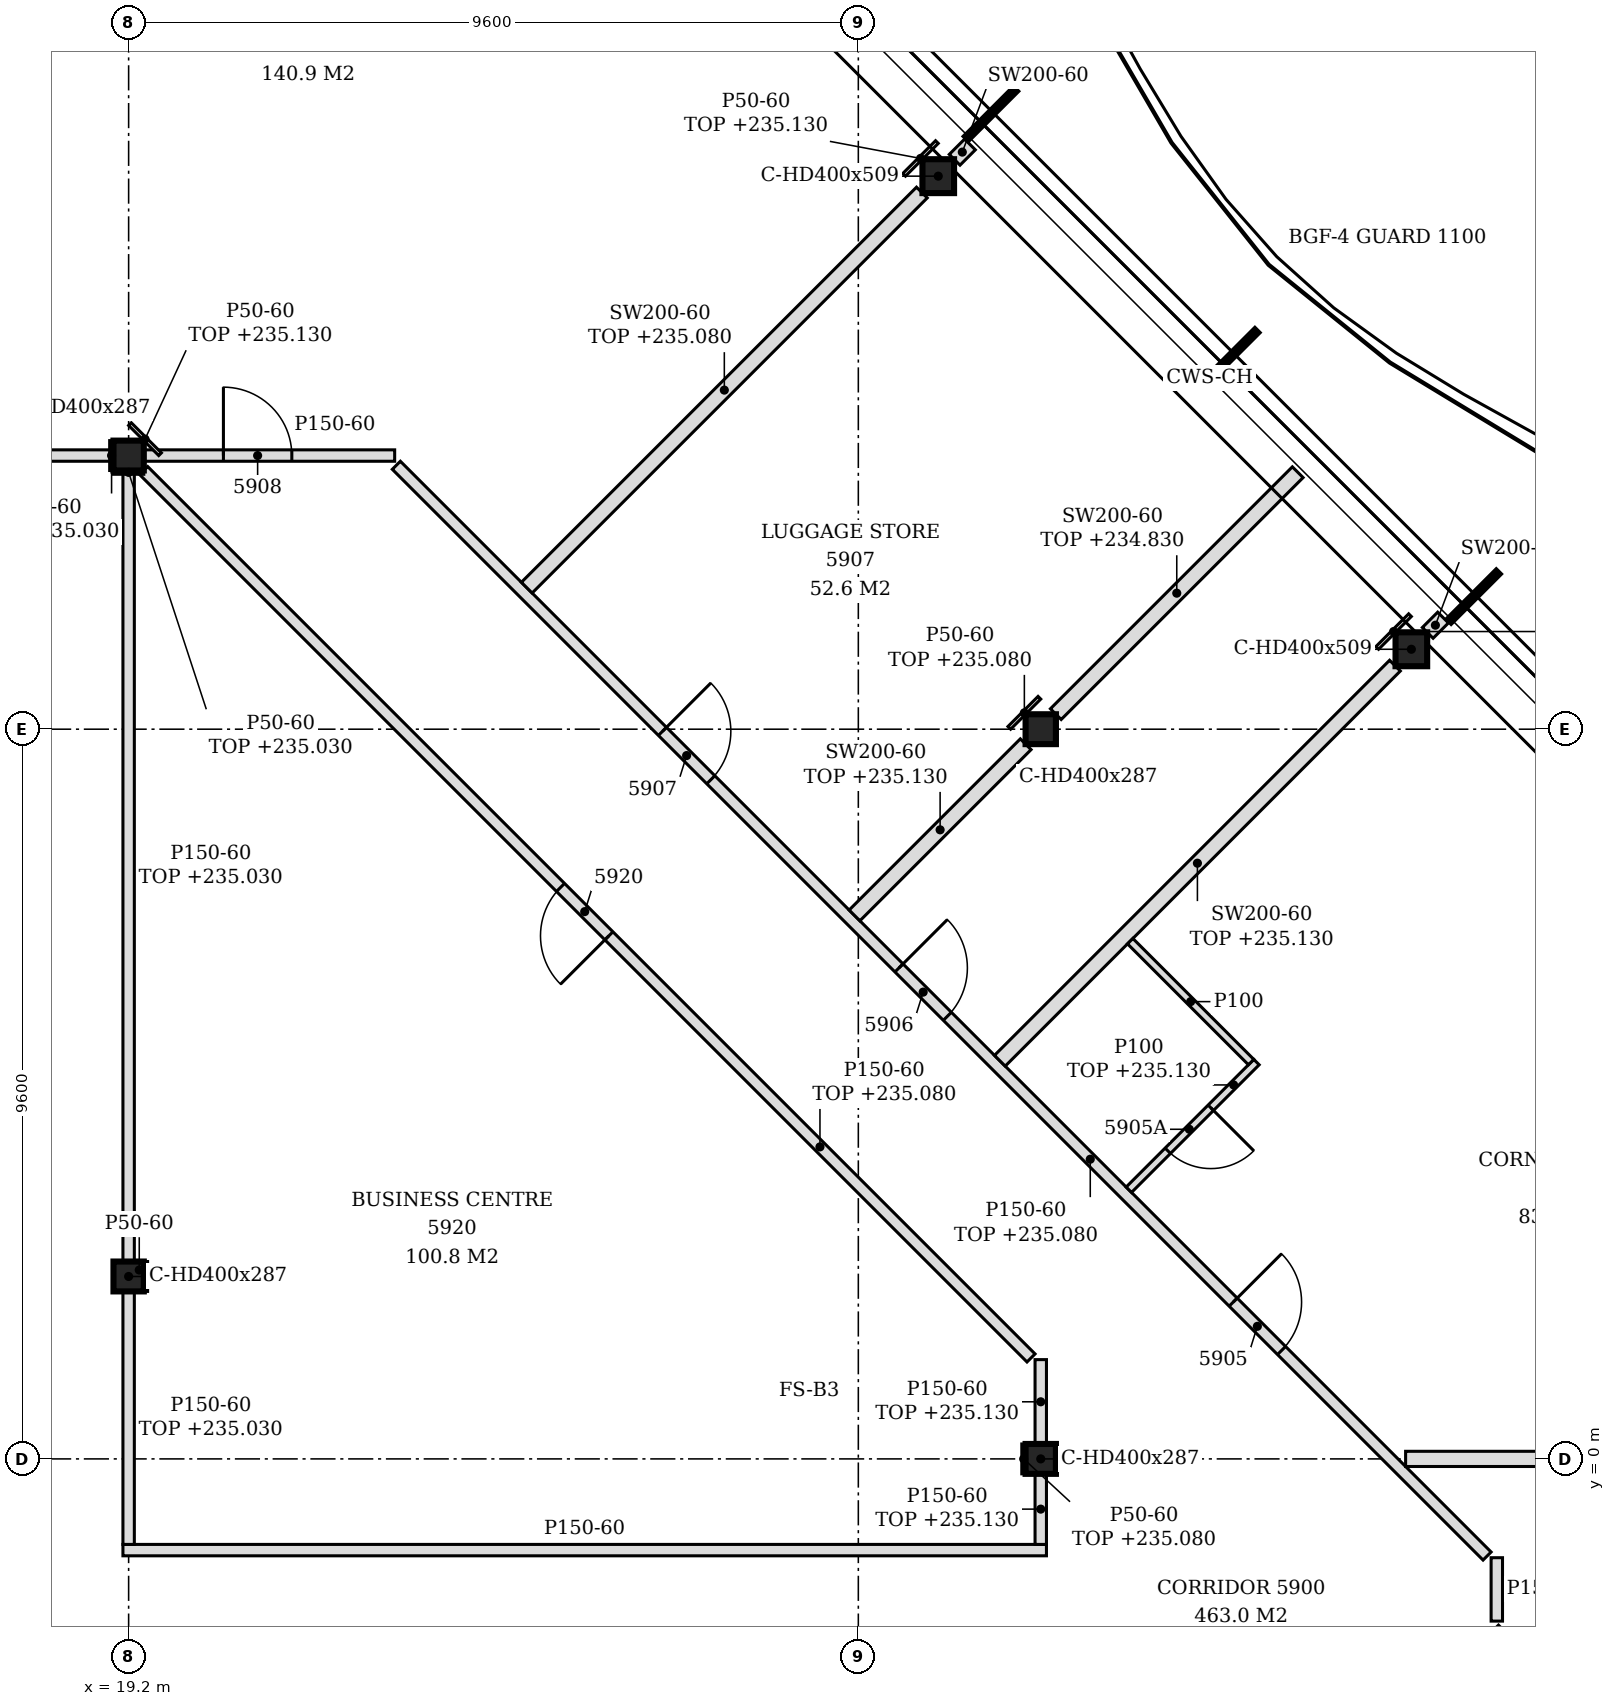
"""IFC4 building model, lengths in metres.
Left out: names, types, materials, properties, quantities, classifications, styles, units other than length and angle.
Written with IfcOpenShell. Run it as: python <this file> out.ifc"""

import sys

from ifc_helpers import new_model, si_unit, direction, frame, frame_2d, origin, origin_2d, place, context, subcontext, project, spatial, polyline, rectangle, i_section, outline, extrude, element, fill, save


model = new_model("IFC4")
c1 = context("Model", 3, precision=1e-05, world=origin(), true_north=direction((0.0, 1.0)))
c2 = subcontext(c1, "Body", "Model", "MODEL_VIEW")
j1 = project(units=[si_unit("LENGTHUNIT", "METRE"), si_unit("PLANEANGLEUNIT", "RADIAN")], contexts=[c1])
p1 = place(None, origin())
s1 = spatial("IfcSite", under=j1, at=p1, CompositionType="ELEMENT")
p2 = place(p1, origin())
s2 = spatial("IfcBuilding", under=s1, at=p2, CompositionType="ELEMENT")
p3 = place(p2, frame((0.0, 0.0, 232.2)))
s3 = spatial("IfcBuildingStorey", under=s2, at=p3, CompositionType="ELEMENT", Elevation=232.2)
for number, where, z_axis, x_axis in (
    (1, (36.076, 10.652, -0.15), (0.0, 0.0, 1.0), (1.0, 0.0, 0.0)),
    (2, (29.852, 16.876, -0.15), (0.0, 0.0, 1.0), (1.0, 0.0, 0.0)),
):
    element("IfcColumn", number, at=place(p3, frame(where, z_axis=z_axis, x_axis=x_axis)), inside=s3, PredefinedType="COLUMN", context=c2, shape_type="SweptSolid", body=[
        extrude(i_section(OverallWidth=0.416, OverallDepth=0.446, WebThickness=0.039, FlangeThickness=0.063, FilletRadius=0.015, at=origin_2d()), origin(), (0.0, 0.0, 1.0), 3.6),
    ])
for number, where, z_axis, x_axis in (
    (3, (19.2, 2.4, -0.15), (0.0, 0.0, 1.0), (1.0, 0.0, 0.0)),
    (4, (19.2, 13.2, -0.15), (0.0, 0.0, 1.0), (1.0, 0.0, 0.0)),
    (5, (31.2, 0.0, -0.15), (0.0, 0.0, 1.0), (1.0, 0.0, 0.0)),
    (6, (31.2, 9.6, -0.15), (0.0, 0.0, 1.0), (1.0, 0.0, 0.0)),
):
    element("IfcColumn", number, at=place(p3, frame(where, z_axis=z_axis, x_axis=x_axis)), inside=s3, PredefinedType="COLUMN", context=c2, shape_type="SweptSolid", body=[
        extrude(i_section(OverallWidth=0.399, OverallDepth=0.393, WebThickness=0.023, FlangeThickness=0.037, FilletRadius=0.015, at=origin_2d()), origin(), (0.0, 0.0, 1.0), 3.6),
    ])
p4 = place(p3, frame((35.503, -4.012, 0.0), z_axis=(0.0, 0.0, 1.0), x_axis=(0.707106781187, 0.707106781187, 0.0)))
e7 = element("IfcWall", 7, at=p4, inside=s3, PredefinedType="PARTITIONING", context=c2, shape_type="SweptSolid", body=[
    extrude(rectangle(XDim=2.506, YDim=0.15, at=frame_2d((1.253, 0.0))), origin(), (0.0, 0.0, 1.0), 3.45),
])
p5 = place(p3, frame((37.2, -2.134, 0.0), z_axis=(0.0, 0.0, 1.0), x_axis=(0.0, 1.0, 0.0)))
e8 = element("IfcWall", 8, at=p5, inside=s3, PredefinedType="PARTITIONING", context=c2, shape_type="SweptSolid", body=[
    extrude(rectangle(XDim=0.834, YDim=0.15, at=frame_2d((0.417, 0.0))), origin(), (0.0, 0.0, 1.0), 3.45),
])
p6 = place(p3, frame((37.072, -1.278, 0.0), z_axis=(0.0, 0.0, 1.0), x_axis=(-0.707106781187, 0.707106781187, 0.0)))
e9 = element("IfcWall", 9, at=p6, inside=s3, PredefinedType="PARTITIONING", context=c2, shape_type="SweptSolid", body=[
    extrude(rectangle(XDim=20.294, YDim=0.15, at=frame_2d((10.147, 0.0))), origin(), (0.0, 0.0, 1.0), 2.88),
])
p7 = place(p6, frame((3.824, 0.0, 0.0)))
e10 = element("IfcOpeningElement", 10, at=p7, cuts=e9, PredefinedType="OPENING", context=c2, shape_type="SweptSolid", body=[
    extrude(rectangle(XDim=0.9, YDim=2.1, at=frame_2d((0.45, 1.05))), frame((0.0, 0.085, 0.0), z_axis=(0.0, -1.0, 0.0), x_axis=(1.0, 0.0, 0.0)), (0.0, 0.0, 1.0), 0.17),
])
p8 = place(p6, frame((10.042, 0.0, 0.0)))
e11 = element("IfcOpeningElement", 11, at=p8, cuts=e9, PredefinedType="OPENING", context=c2, shape_type="SweptSolid", body=[
    extrude(rectangle(XDim=0.9, YDim=2.1, at=frame_2d((0.45, 1.05))), frame((0.0, 0.085, 0.0), z_axis=(0.0, -1.0, 0.0), x_axis=(1.0, 0.0, 0.0)), (0.0, 0.0, 1.0), 0.17),
])
p9 = place(p6, frame((14.443, 0.0, 0.0)))
e12 = element("IfcOpeningElement", 12, at=p9, cuts=e9, PredefinedType="OPENING", context=c2, shape_type="SweptSolid", body=[
    extrude(rectangle(XDim=0.9, YDim=2.1, at=frame_2d((0.45, 1.05))), frame((0.0, 0.085, 0.0), z_axis=(0.0, -1.0, 0.0), x_axis=(1.0, 0.0, 0.0)), (0.0, 0.0, 1.0), 0.17),
])
p10 = place(p3, frame((19.125, -1.2, 0.0), z_axis=(0.0, 0.0, 1.0), x_axis=(1.0, 0.0, 0.0)))
e13 = element("IfcWall", 13, at=p10, inside=s3, PredefinedType="PARTITIONING", context=c2, shape_type="SweptSolid", body=[
    extrude(outline(polyline([(0.0, 0.0), (12.15, 0.0), (12.15, 2.93), (11.925, 2.93), (11.923, 3.45), (0.225, 3.45), (0.223, 2.83), (0.0, 2.83), (0.0, 0.0)])), frame((0.0, 0.075, 0.0), z_axis=(0.0, -1.0, 0.0), x_axis=(1.0, 0.0, 0.0)), (0.0, 0.0, 1.0), 0.15),
])
p11 = place(p3, frame((19.2, -1.125, 0.0), z_axis=(0.0, 0.0, 1.0), x_axis=(0.0, 1.0, 0.0)))
e14 = element("IfcWall", 14, at=p11, inside=s3, PredefinedType="PARTITIONING", context=c2, shape_type="SweptSolid", body=[
    extrude(rectangle(XDim=3.329, YDim=0.15, at=frame_2d((1.664, 0.0))), origin(), (0.0, 0.0, 1.0), 2.83),
])
p12 = place(p3, frame((31.2, -1.125, 0.0), z_axis=(0.0, 0.0, 1.0), x_axis=(0.0, 1.0, 0.0)))
e15 = element("IfcWall", 15, at=p12, inside=s3, PredefinedType="PARTITIONING", context=c2, shape_type="SweptSolid", body=[
    extrude(rectangle(XDim=0.928, YDim=0.15, at=frame_2d((0.464, 0.0))), origin(), (0.0, 0.0, 1.0), 2.93),
])
p13 = place(p3, frame((36.0, 0.0, 0.0), z_axis=(0.0, 0.0, 1.0), x_axis=(1.0, 0.0, 0.0)))
e16 = element("IfcWall", 16, at=p13, inside=s3, PredefinedType="PARTITIONING", context=c2, shape_type="SweptSolid", body=[
    extrude(rectangle(XDim=6.85, YDim=0.2, at=frame_2d((3.425, 0.0))), origin(), (0.0, 0.0, 1.0), 2.88),
])
p14 = place(p3, frame((31.2, 0.197, 0.0), z_axis=(0.0, 0.0, 1.0), x_axis=(0.0, 1.0, 0.0)))
e17 = element("IfcWall", 17, at=p14, inside=s3, PredefinedType="PARTITIONING", context=c2, shape_type="SweptSolid", body=[
    extrude(rectangle(XDim=1.11, YDim=0.15, at=frame_2d((0.555, 0.0))), origin(), (0.0, 0.0, 1.0), 2.93),
])
p15 = place(p3, frame((31.072, 1.328, 0.0), z_axis=(0.0, 0.0, 1.0), x_axis=(-0.707106781187, 0.707106781187, 0.0)))
e18 = element("IfcWall", 18, at=p15, inside=s3, PredefinedType="PARTITIONING", context=c2, shape_type="SweptSolid", body=[
    extrude(rectangle(XDim=16.51, YDim=0.15, at=frame_2d((8.255, 0.0))), origin(), (0.0, 0.0, 1.0), 2.88),
])
p16 = place(p15, frame((7.854, 0.0, 0.0)))
e19 = element("IfcOpeningElement", 19, at=p16, cuts=e18, PredefinedType="OPENING", context=c2, shape_type="SweptSolid", body=[
    extrude(rectangle(XDim=0.9, YDim=2.1, at=frame_2d((0.45, 1.05))), frame((0.0, 0.085, 0.0), z_axis=(0.0, -1.0, 0.0), x_axis=(1.0, 0.0, 0.0)), (0.0, 0.0, 1.0), 0.17),
])
p17 = place(p3, frame((19.2, 2.596, 0.0), z_axis=(0.0, 0.0, 1.0), x_axis=(0.0, 1.0, 0.0)))
e20 = element("IfcWall", 20, at=p17, inside=s3, PredefinedType="PARTITIONING", context=c2, shape_type="SweptSolid", body=[
    extrude(rectangle(XDim=10.407, YDim=0.15, at=frame_2d((5.204, 0.0))), origin(), (0.0, 0.0, 1.0), 2.83),
])
p18 = place(p3, frame((32.359, 3.541, 0.0), z_axis=(0.0, 0.0, 1.0), x_axis=(0.707158179099, 0.707055379538, 0.0)))
e21 = element("IfcWall", 21, at=p18, inside=s3, PredefinedType="PARTITIONING", context=c2, shape_type="SweptSolid", body=[
    extrude(rectangle(XDim=2.375, YDim=0.1, at=frame_2d((1.188, 0.0))), origin(), (0.0, 0.0, 1.0), 2.93),
])
p19 = place(p18, frame((0.725, 0.0, 0.0)))
e22 = element("IfcOpeningElement", 22, at=p19, cuts=e21, PredefinedType="OPENING", context=c2, shape_type="SweptSolid", body=[
    extrude(rectangle(XDim=0.8, YDim=2.1, at=frame_2d((0.4, 1.05))), frame((0.0, 0.06, 0.0), z_axis=(0.0, -1.0, 0.0), x_axis=(1.0, 0.0, 0.0)), (0.0, 0.0, 1.0), 0.12),
])
p20 = place(p3, frame((30.662, 5.238, 0.0), z_axis=(0.0, 0.0, 1.0), x_axis=(0.707106781187, 0.707106781187, 0.0)))
e23 = element("IfcWall", 23, at=p20, inside=s3, PredefinedType="PARTITIONING", context=c2, shape_type="SweptSolid", body=[
    extrude(rectangle(XDim=7.351, YDim=0.2, at=frame_2d((3.676, 0.0))), origin(), (0.0, 0.0, 1.0), 2.93),
])
p21 = place(p3, frame((33.968, 5.22, 0.0), z_axis=(0.0, 0.0, 1.0), x_axis=(-0.707106781187, 0.707106781187, 0.0)))
e24 = element("IfcWall", 24, at=p21, inside=s3, PredefinedType="PARTITIONING", context=c2, shape_type="SweptSolid", body=[
    extrude(rectangle(XDim=2.25, YDim=0.1, at=frame_2d((1.125, 0.0))), origin(), (0.0, 0.0, 1.0), 3.45),
])
p22 = place(p3, frame((28.75, 7.15, 0.0), z_axis=(0.0, 0.0, 1.0), x_axis=(0.7070684525, 0.707145107796, 0.0)))
e25 = element("IfcWall", 25, at=p22, inside=s3, PredefinedType="PARTITIONING", context=c2, shape_type="SweptSolid", body=[
    extrude(rectangle(XDim=3.185, YDim=0.2, at=frame_2d((1.592, 0.0))), origin(), (0.0, 0.0, 1.0), 2.93),
])
p23 = place(p3, frame((31.398, 9.798, 0.0), z_axis=(0.0, 0.0, 1.0), x_axis=(0.707133900936, 0.707079660397, 0.0)))
e26 = element("IfcWall", 26, at=p23, inside=s3, PredefinedType="PARTITIONING", context=c2, shape_type="SweptSolid", body=[
    extrude(rectangle(XDim=4.501, YDim=0.2, at=frame_2d((2.25, 0.0))), origin(), (0.0, 0.0, 1.0), 2.63),
])
p24 = place(p3, frame((36.291, 10.867, 0.0), z_axis=(0.0, 0.0, 1.0), x_axis=(0.707534423513, 0.706678880075, 0.0)))
e27 = element("IfcWall", 27, at=p24, inside=s3, PredefinedType="PARTITIONING", context=c2, shape_type="SweptSolid", body=[
    extrude(rectangle(XDim=0.285, YDim=0.2, at=frame_2d((0.143, 0.0))), origin(), (0.0, 0.0, 1.0), 3.45),
])
p25 = place(p3, frame((24.438, 11.462, 0.0), z_axis=(0.0, 0.0, 1.0), x_axis=(0.707090175614, 0.707123386369, 0.0)))
e28 = element("IfcWall", 28, at=p25, inside=s3, PredefinedType="PARTITIONING", context=c2, shape_type="SweptSolid", body=[
    extrude(rectangle(XDim=7.351, YDim=0.2, at=frame_2d((3.676, 0.0))), origin(), (0.0, 0.0, 1.0), 2.88),
])
p26 = place(p3, frame((7.399, 13.2, 0.0), z_axis=(0.0, 0.0, 1.0), x_axis=(1.0, 0.0, 0.0)))
e29 = element("IfcWall", 29, at=p26, inside=s3, PredefinedType="PARTITIONING", context=c2, shape_type="SweptSolid", body=[
    extrude(rectangle(XDim=11.601, YDim=0.15, at=frame_2d((5.801, 0.0))), origin(), (0.0, 0.0, 1.0), 2.83),
])
p27 = place(p26, frame((3.225, 0.0, 0.0)))
e30 = element("IfcOpeningElement", 30, at=p27, cuts=e29, PredefinedType="OPENING", context=c2, shape_type="SweptSolid", body=[
    extrude(rectangle(XDim=1.8, YDim=2.1, at=frame_2d((0.9, 1.05))), frame((0.0, 0.085, 0.0), z_axis=(0.0, -1.0, 0.0), x_axis=(1.0, 0.0, 0.0)), (0.0, 0.0, 1.0), 0.17),
])
p28 = place(p3, frame((19.399, 13.2, 0.0), z_axis=(0.0, 0.0, 1.0), x_axis=(1.0, 0.0, 0.0)))
e31 = element("IfcWall", 31, at=p28, inside=s3, PredefinedType="PARTITIONING", context=c2, shape_type="SweptSolid", body=[
    extrude(rectangle(XDim=3.301, YDim=0.15, at=frame_2d((1.65, 0.0))), origin(), (0.0, 0.0, 1.0), 3.45),
])
p29 = place(p28, frame((1.048, 0.0, 0.0)))
e32 = element("IfcOpeningElement", 32, at=p29, cuts=e31, PredefinedType="OPENING", context=c2, shape_type="SweptSolid", body=[
    extrude(rectangle(XDim=0.9, YDim=2.1, at=frame_2d((0.45, 1.05))), frame((0.0, 0.085, 0.0), z_axis=(0.0, -1.0, 0.0), x_axis=(1.0, 0.0, 0.0)), (0.0, 0.0, 1.0), 0.17),
])
p30 = place(p3, frame((30.067, 17.091, 0.0), z_axis=(0.0, 0.0, 1.0), x_axis=(0.707106781187, 0.707106781187, 0.0)))
e33 = element("IfcWall", 33, at=p30, inside=s3, PredefinedType="PARTITIONING", context=c2, shape_type="SweptSolid", body=[
    extrude(rectangle(XDim=0.285, YDim=0.2, at=frame_2d((0.143, 0.0))), origin(), (0.0, 0.0, 1.0), 3.45),
])
p31 = place(p3, frame((19.425, 2.204, 0.0), z_axis=(0.0, 0.0, 1.0), x_axis=(0.0, 1.0, 0.0)))
e34 = element("IfcWall", 34, at=p31, inside=s3, PredefinedType="PARTITIONING", context=c2, shape_type="SweptSolid", body=[
    extrude(rectangle(XDim=0.393, YDim=0.05, at=frame_2d((0.196, 0.0))), origin(), (0.0, 0.0, 1.0), 3.45),
])
p32 = place(p3, frame((18.976, 13.003, 0.0), z_axis=(0.0, 0.0, 1.0), x_axis=(0.0, 1.0, 0.0)))
e35 = element("IfcWall", 35, at=p32, inside=s3, PredefinedType="PARTITIONING", context=c2, shape_type="SweptSolid", body=[
    extrude(rectangle(XDim=0.393, YDim=0.05, at=frame_2d((0.197, 0.0))), origin(), (0.0, 0.0, 1.0), 2.83),
])
p33 = place(p3, frame((30.976, -0.197, 0.0), z_axis=(0.0, 0.0, 1.0), x_axis=(0.0, 1.0, 0.0)))
e36 = element("IfcWall", 36, at=p33, inside=s3, PredefinedType="PARTITIONING", context=c2, shape_type="SweptSolid", body=[
    extrude(rectangle(XDim=0.393, YDim=0.05, at=frame_2d((0.197, 0.0))), origin(), (0.0, 0.0, 1.0), 2.88),
])
p34 = place(p3, frame((19.614, 13.218, 0.0), z_axis=(0.0, 0.0, 1.0), x_axis=(-0.707106781187, 0.707106781187, 0.0)))
e37 = element("IfcWall", 37, at=p34, inside=s3, PredefinedType="PARTITIONING", context=c2, shape_type="SweptSolid", body=[
    extrude(rectangle(XDim=0.56, YDim=0.05, at=frame_2d((0.28, 0.0))), origin(), (0.0, 0.0, 1.0), 2.93),
])
p35 = place(p3, frame((35.627, 10.669, 0.0), z_axis=(0.0, 0.0, 1.0), x_axis=(0.707307009627, 0.706906496032, 0.0)))
e38 = element("IfcWall", 38, at=p35, inside=s3, PredefinedType="PARTITIONING", context=c2, shape_type="SweptSolid", body=[
    extrude(rectangle(XDim=0.61, YDim=0.05, at=frame_2d((0.305, 0.0))), origin(), (0.0, 0.0, 1.0), 2.63),
])
p36 = place(p3, frame((30.786, 9.618, 0.0), z_axis=(0.0, 0.0, 1.0), x_axis=(0.707106781187, 0.707106781187, 0.0)))
e39 = element("IfcWall", 39, at=p36, inside=s3, PredefinedType="PARTITIONING", context=c2, shape_type="SweptSolid", body=[
    extrude(rectangle(XDim=0.56, YDim=0.05, at=frame_2d((0.28, 0.0))), origin(), (0.0, 0.0, 1.0), 2.88),
])
p37 = place(p3, frame((29.403, 16.893, 0.0), z_axis=(0.0, 0.0, 1.0), x_axis=(0.706906496032, 0.707307009627, 0.0)))
e40 = element("IfcWall", 40, at=p37, inside=s3, PredefinedType="PARTITIONING", context=c2, shape_type="SweptSolid", body=[
    extrude(rectangle(XDim=0.61, YDim=0.05, at=frame_2d((0.305, 0.0))), origin(), (0.0, 0.0, 1.0), 2.93),
])
p38 = place(p3, frame((19.0, 12.979, 0.0), z_axis=(0.0, 0.0, 1.0), x_axis=(1.0, 0.0, 0.0)))
e41 = element("IfcWall", 41, at=p38, inside=s3, PredefinedType="PARTITIONING", context=c2, shape_type="SweptSolid", body=[
    extrude(rectangle(XDim=0.399, YDim=0.05, at=frame_2d((0.199, 0.0))), origin(), (0.0, 0.0, 1.0), 2.83),
])
p39 = place(p7, frame((0.9, 0.0, 0.0), z_axis=(0.0, 0.0, 1.0), x_axis=(-1.0, 0.0, 0.0)))
e42 = element("IfcDoor", 42, at=p39, inside=s3, OperationType="SINGLE_SWING_LEFT", PredefinedType="DOOR", context=c2, shape_type="SweptSolid", body=[
    extrude(rectangle(XDim=0.9, YDim=2.1, at=frame_2d((0.45, 1.05))), frame((0.0, 0.025, 0.0), z_axis=(0.0, -1.0, 0.0), x_axis=(1.0, 0.0, 0.0)), (0.0, 0.0, 1.0), 0.05),
])
fill(e10, e42)
p40 = place(p19, frame((0.8, 0.0, 0.0), z_axis=(0.0, 0.0, 1.0), x_axis=(-1.0, 0.0, 0.0)))
e43 = element("IfcDoor", 43, at=p40, inside=s3, OperationType="SINGLE_SWING_LEFT", PredefinedType="DOOR", context=c2, shape_type="SweptSolid", body=[
    extrude(rectangle(XDim=0.8, YDim=2.1, at=frame_2d((0.4, 1.05))), frame((0.0, 0.025, 0.0), z_axis=(0.0, -1.0, 0.0), x_axis=(1.0, 0.0, 0.0)), (0.0, 0.0, 1.0), 0.05),
])
fill(e22, e43)
p41 = place(p8, frame((0.9, 0.0, 0.0), z_axis=(0.0, 0.0, 1.0), x_axis=(-1.0, 0.0, 0.0)))
e44 = element("IfcDoor", 44, at=p41, inside=s3, OperationType="SINGLE_SWING_LEFT", PredefinedType="DOOR", context=c2, shape_type="SweptSolid", body=[
    extrude(rectangle(XDim=0.9, YDim=2.1, at=frame_2d((0.45, 1.05))), frame((0.0, 0.025, 0.0), z_axis=(0.0, -1.0, 0.0), x_axis=(1.0, 0.0, 0.0)), (0.0, 0.0, 1.0), 0.05),
])
fill(e11, e44)
p42 = place(p9, frame((0.9, 0.0, 0.0), z_axis=(0.0, 0.0, 1.0), x_axis=(-1.0, 0.0, 0.0)))
e45 = element("IfcDoor", 45, at=p42, inside=s3, OperationType="SINGLE_SWING_LEFT", PredefinedType="DOOR", context=c2, shape_type="SweptSolid", body=[
    extrude(rectangle(XDim=0.9, YDim=2.1, at=frame_2d((0.45, 1.05))), frame((0.0, 0.025, 0.0), z_axis=(0.0, -1.0, 0.0), x_axis=(1.0, 0.0, 0.0)), (0.0, 0.0, 1.0), 0.05),
])
fill(e12, e45)
p43 = place(p29, origin())
e46 = element("IfcDoor", 46, at=p43, inside=s3, OperationType="SINGLE_SWING_LEFT", PredefinedType="DOOR", context=c2, shape_type="SweptSolid", body=[
    extrude(rectangle(XDim=0.9, YDim=2.1, at=frame_2d((0.45, 1.05))), frame((0.0, 0.025, 0.0), z_axis=(0.0, -1.0, 0.0), x_axis=(1.0, 0.0, 0.0)), (0.0, 0.0, 1.0), 0.05),
])
fill(e32, e46)
p44 = place(p16, origin())
e47 = element("IfcDoor", 47, at=p44, inside=s3, OperationType="SINGLE_SWING_LEFT", PredefinedType="DOOR", context=c2, shape_type="SweptSolid", body=[
    extrude(rectangle(XDim=0.9, YDim=2.1, at=frame_2d((0.45, 1.05))), frame((0.0, 0.025, 0.0), z_axis=(0.0, -1.0, 0.0), x_axis=(1.0, 0.0, 0.0)), (0.0, 0.0, 1.0), 0.05),
])
fill(e19, e47)
save(model, sys.argv[1])
